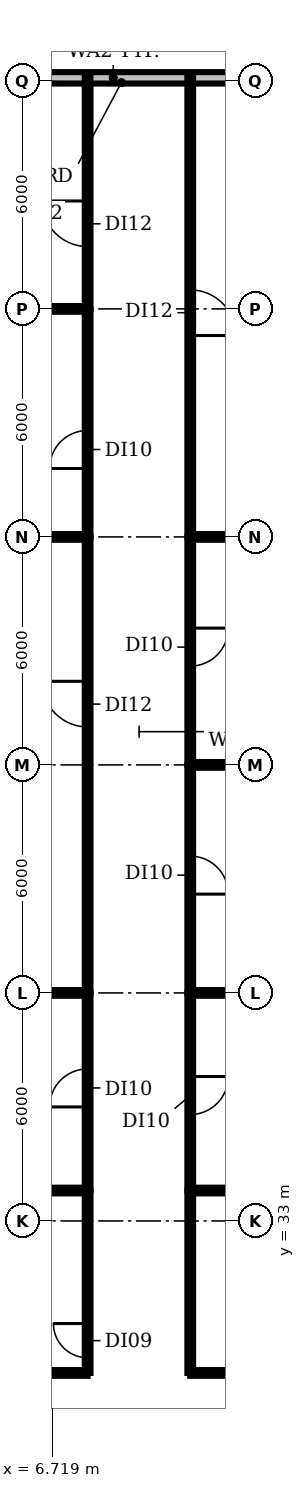
"""IFC4 building model, lengths in metres.
Left out: names, types, materials, properties, quantities, classifications, styles, units other than length and angle.
Written with IfcOpenShell. Run it as: python <this file> out.ifc"""

import sys

from ifc_helpers import new_model, si_unit, direction, frame, frame_2d, origin, place, context, subcontext, project, spatial, rectangle, extrude, element, fill, save


model = new_model("IFC4")
c1 = context("Model", 3, precision=1e-05, world=origin(), true_north=direction((0.0, 1.0)))
c2 = subcontext(c1, "Body", "Model", "MODEL_VIEW")
j1 = project(units=[si_unit("LENGTHUNIT", "METRE"), si_unit("PLANEANGLEUNIT", "RADIAN")], contexts=[c1])
p1 = place(None, origin())
s1 = spatial("IfcSite", under=j1, at=p1, CompositionType="ELEMENT")
p2 = place(p1, origin())
s2 = spatial("IfcBuilding", under=s1, at=p2, CompositionType="ELEMENT")
p3 = place(p2, frame((0.0, 0.0, 297.8)))
s3 = spatial("IfcBuildingStorey", under=s2, at=p3, CompositionType="ELEMENT", Elevation=297.8)
p4 = place(p3, frame((13.217, 63.08, 0.0), z_axis=(0.0, 0.0, 1.0), x_axis=(-1.0, 0.0, 0.0)))
e1 = element("IfcWall", 1, at=p4, inside=s3, PredefinedType="SOLIDWALL", context=c2, shape_type="SweptSolid", body=[
    extrude(rectangle(XDim=9.785, YDim=0.3, at=frame_2d((4.893, 0.0))), origin(), (0.0, 0.0, 1.0), 3.85),
])
p5 = place(p3, frame((-2.24, 57.0, 0.0), z_axis=(0.0, 0.0, 1.0), x_axis=(1.0, 0.0, 0.0)))
e2 = element("IfcWall", 2, at=p5, inside=s3, PredefinedType="PARTITIONING", context=c2, shape_type="SweptSolid", body=[
    extrude(rectangle(XDim=9.89, YDim=0.15, at=frame_2d((4.945, 0.0))), origin(), (0.0, 0.0, 1.0), 2.9),
])
p6 = place(p3, frame((-1.98, 51.0, 0.0), z_axis=(0.0, 0.0, 1.0), x_axis=(1.0, 0.0, 0.0)))
e3 = element("IfcWall", 3, at=p6, inside=s3, PredefinedType="PARTITIONING", context=c2, shape_type="SweptSolid", body=[
    extrude(rectangle(XDim=9.63, YDim=0.15, at=frame_2d((4.815, 0.0))), origin(), (0.0, 0.0, 1.0), 2.9),
])
p7 = place(p3, frame((-1.46, 39.0, 0.0), z_axis=(0.0, 0.0, 1.0), x_axis=(1.0, 0.0, 0.0)))
e4 = element("IfcWall", 4, at=p7, inside=s3, PredefinedType="PARTITIONING", context=c2, shape_type="SweptSolid", body=[
    extrude(rectangle(XDim=9.11, YDim=0.15, at=frame_2d((4.555, 0.0))), origin(), (0.0, 0.0, 1.0), 2.9),
])
p8 = place(p3, frame((-1.23, 33.8, 0.0), z_axis=(0.0, 0.0, 1.0), x_axis=(1.0, 0.0, 0.0)))
e5 = element("IfcWall", 5, at=p8, inside=s3, PredefinedType="PARTITIONING", context=c2, shape_type="SweptSolid", body=[
    extrude(rectangle(XDim=8.88, YDim=0.15, at=frame_2d((4.44, 0.0))), origin(), (0.0, 0.0, 1.0), 2.9),
])
p9 = place(p3, frame((3.0, 29.0, 0.0), z_axis=(0.0, 0.0, 1.0), x_axis=(1.0, 0.0, 0.0)))
e6 = element("IfcWall", 6, at=p9, inside=s3, PredefinedType="PARTITIONING", context=c2, shape_type="SweptSolid", body=[
    extrude(rectangle(XDim=4.65, YDim=0.15, at=frame_2d((2.325, 0.0))), origin(), (0.0, 0.0, 1.0), 2.9),
])
p10 = place(p3, frame((7.65, 29.0, 0.0), z_axis=(0.0, 0.0, 1.0), x_axis=(0.0, 1.0, 0.0)))
e7 = element("IfcWall", 7, at=p10, inside=s3, PredefinedType="PARTITIONING", context=c2, shape_type="SweptSolid", body=[
    extrude(rectangle(XDim=4.8, YDim=0.15, at=frame_2d((2.4, 0.0))), origin(), (0.0, 0.0, 1.0), 2.9),
])
p11 = place(p10, frame((0.4, 0.0, 0.0)))
e8 = element("IfcOpeningElement", 8, at=p11, cuts=e7, PredefinedType="OPENING", context=c2, shape_type="SweptSolid", body=[
    extrude(rectangle(XDim=0.9, YDim=2.1, at=frame_2d((0.45, 1.05))), frame((0.0, 0.085, 0.0), z_axis=(0.0, -1.0, 0.0), x_axis=(1.0, 0.0, 0.0)), (0.0, 0.0, 1.0), 0.17),
])
p12 = place(p3, frame((7.65, 33.8, 0.0), z_axis=(0.0, 0.0, 1.0), x_axis=(0.0, 1.0, 0.0)))
e9 = element("IfcWall", 9, at=p12, inside=s3, PredefinedType="PARTITIONING", context=c2, shape_type="SweptSolid", body=[
    extrude(rectangle(XDim=5.2, YDim=0.15, at=frame_2d((2.6, 0.0))), origin(), (0.0, 0.0, 1.0), 2.9),
])
p13 = place(p12, frame((2.2, 0.0, 0.0)))
e10 = element("IfcOpeningElement", 10, at=p13, cuts=e9, PredefinedType="OPENING", context=c2, shape_type="SweptSolid", body=[
    extrude(rectangle(XDim=1.0, YDim=2.1, at=frame_2d((0.5, 1.05))), frame((0.0, 0.085, 0.0), z_axis=(0.0, -1.0, 0.0), x_axis=(1.0, 0.0, 0.0)), (0.0, 0.0, 1.0), 0.17),
])
p14 = place(p3, frame((7.65, 39.0, 0.0), z_axis=(0.0, 0.0, 1.0), x_axis=(0.0, 1.0, 0.0)))
e11 = element("IfcWall", 11, at=p14, inside=s3, PredefinedType="PARTITIONING", context=c2, shape_type="SweptSolid", body=[
    extrude(rectangle(XDim=12.0, YDim=0.15, at=frame_2d((6.0, 0.0))), origin(), (0.0, 0.0, 1.0), 2.9),
])
p15 = place(p14, frame((7.0, 0.0, 0.0)))
e12 = element("IfcOpeningElement", 12, at=p15, cuts=e11, PredefinedType="OPENING", context=c2, shape_type="SweptSolid", body=[
    extrude(rectangle(XDim=1.2, YDim=2.1, at=frame_2d((0.6, 1.05))), frame((0.0, 0.085, 0.0), z_axis=(0.0, -1.0, 0.0), x_axis=(1.0, 0.0, 0.0)), (0.0, 0.0, 1.0), 0.17),
])
p16 = place(p3, frame((7.65, 51.0, 0.0), z_axis=(0.0, 0.0, 1.0), x_axis=(0.0, 1.0, 0.0)))
e13 = element("IfcWall", 13, at=p16, inside=s3, PredefinedType="PARTITIONING", context=c2, shape_type="SweptSolid", body=[
    extrude(rectangle(XDim=6.0, YDim=0.15, at=frame_2d((3.0, 0.0))), origin(), (0.0, 0.0, 1.0), 2.9),
])
p17 = place(p16, frame((1.8, 0.0, 0.0)))
e14 = element("IfcOpeningElement", 14, at=p17, cuts=e13, PredefinedType="OPENING", context=c2, shape_type="SweptSolid", body=[
    extrude(rectangle(XDim=1.0, YDim=2.1, at=frame_2d((0.5, 1.05))), frame((0.0, 0.085, 0.0), z_axis=(0.0, -1.0, 0.0), x_axis=(1.0, 0.0, 0.0)), (0.0, 0.0, 1.0), 0.17),
])
p18 = place(p3, frame((7.65, 57.0, 0.0), z_axis=(0.0, 0.0, 1.0), x_axis=(0.0, 1.0, 0.0)))
e15 = element("IfcWall", 15, at=p18, inside=s3, PredefinedType="PARTITIONING", context=c2, shape_type="SweptSolid", body=[
    extrude(rectangle(XDim=6.09, YDim=0.15, at=frame_2d((3.045, 0.0))), origin(), (0.0, 0.0, 1.0), 2.9),
])
p19 = place(p18, frame((1.64, 0.0, 0.0)))
e16 = element("IfcOpeningElement", 16, at=p19, cuts=e15, PredefinedType="OPENING", context=c2, shape_type="SweptSolid", body=[
    extrude(rectangle(XDim=1.2, YDim=2.1, at=frame_2d((0.6, 1.05))), frame((0.0, 0.085, 0.0), z_axis=(0.0, -1.0, 0.0), x_axis=(1.0, 0.0, 0.0)), (0.0, 0.0, 1.0), 0.17),
])
p20 = place(p3, frame((10.35, 29.0, 0.0), z_axis=(0.0, 0.0, 1.0), x_axis=(0.0, 1.0, 0.0)))
e17 = element("IfcWall", 17, at=p20, inside=s3, PredefinedType="PARTITIONING", context=c2, shape_type="SweptSolid", body=[
    extrude(rectangle(XDim=4.8, YDim=0.15, at=frame_2d((2.4, 0.0))), origin(), (0.0, 0.0, 1.0), 2.9),
])
p21 = place(p3, frame((10.35, 29.0, 0.0), z_axis=(0.0, 0.0, 1.0), x_axis=(1.0, 0.0, 0.0)))
e18 = element("IfcWall", 18, at=p21, inside=s3, PredefinedType="PARTITIONING", context=c2, shape_type="SweptSolid", body=[
    extrude(rectangle(XDim=4.05, YDim=0.15, at=frame_2d((2.025, 0.0))), origin(), (0.0, 0.0, 1.0), 2.9),
])
p22 = place(p3, frame((10.35, 33.8, 0.0), z_axis=(0.0, 0.0, 1.0), x_axis=(1.0, 0.0, 0.0)))
e19 = element("IfcWall", 19, at=p22, inside=s3, PredefinedType="PARTITIONING", context=c2, shape_type="SweptSolid", body=[
    extrude(rectangle(XDim=11.03, YDim=0.15, at=frame_2d((5.515, 0.0))), origin(), (0.0, 0.0, 1.0), 2.9),
])
p23 = place(p3, frame((10.35, 39.0, 0.0), z_axis=(0.0, 0.0, 1.0), x_axis=(0.0, -1.0, 0.0)))
e20 = element("IfcWall", 20, at=p23, inside=s3, PredefinedType="PARTITIONING", context=c2, shape_type="SweptSolid", body=[
    extrude(rectangle(XDim=5.2, YDim=0.15, at=frame_2d((2.6, 0.0))), origin(), (0.0, 0.0, 1.0), 2.9),
])
p24 = place(p23, frame((2.2, 0.0, 0.0)))
e21 = element("IfcOpeningElement", 21, at=p24, cuts=e20, PredefinedType="OPENING", context=c2, shape_type="SweptSolid", body=[
    extrude(rectangle(XDim=1.0, YDim=2.1, at=frame_2d((0.5, 1.05))), frame((0.0, 0.085, 0.0), z_axis=(0.0, -1.0, 0.0), x_axis=(1.0, 0.0, 0.0)), (0.0, 0.0, 1.0), 0.17),
])
p25 = place(p3, frame((10.35, 39.0, 0.0), z_axis=(0.0, 0.0, 1.0), x_axis=(1.0, 0.0, 0.0)))
e22 = element("IfcWall", 22, at=p25, inside=s3, PredefinedType="PARTITIONING", context=c2, shape_type="SweptSolid", body=[
    extrude(rectangle(XDim=14.63, YDim=0.15, at=frame_2d((7.315, 0.0))), origin(), (0.0, 0.0, 1.0), 2.9),
])
p26 = place(p3, frame((10.35, 45.0, 0.0), z_axis=(0.0, 0.0, 1.0), x_axis=(0.0, -1.0, 0.0)))
e23 = element("IfcWall", 23, at=p26, inside=s3, PredefinedType="PARTITIONING", context=c2, shape_type="SweptSolid", body=[
    extrude(rectangle(XDim=6.0, YDim=0.15, at=frame_2d((3.0, 0.0))), origin(), (0.0, 0.0, 1.0), 2.9),
])
p27 = place(p26, frame((2.4, 0.0, 0.0)))
e24 = element("IfcOpeningElement", 24, at=p27, cuts=e23, PredefinedType="OPENING", context=c2, shape_type="SweptSolid", body=[
    extrude(rectangle(XDim=1.0, YDim=2.1, at=frame_2d((0.5, 1.05))), frame((0.0, 0.085, 0.0), z_axis=(0.0, -1.0, 0.0), x_axis=(1.0, 0.0, 0.0)), (0.0, 0.0, 1.0), 0.17),
])
p28 = place(p3, frame((10.35, 45.0, 0.0), z_axis=(0.0, 0.0, 1.0), x_axis=(1.0, 0.0, 0.0)))
e25 = element("IfcWall", 25, at=p28, inside=s3, PredefinedType="PARTITIONING", context=c2, shape_type="SweptSolid", body=[
    extrude(rectangle(XDim=14.63, YDim=0.15, at=frame_2d((7.315, 0.0))), origin(), (0.0, 0.0, 1.0), 2.9),
])
p29 = place(p3, frame((10.35, 51.0, 0.0), z_axis=(0.0, 0.0, 1.0), x_axis=(0.0, -1.0, 0.0)))
e26 = element("IfcWall", 26, at=p29, inside=s3, PredefinedType="PARTITIONING", context=c2, shape_type="SweptSolid", body=[
    extrude(rectangle(XDim=6.0, YDim=0.15, at=frame_2d((3.0, 0.0))), origin(), (0.0, 0.0, 1.0), 2.9),
])
p30 = place(p29, frame((2.4, 0.0, 0.0)))
e27 = element("IfcOpeningElement", 27, at=p30, cuts=e26, PredefinedType="OPENING", context=c2, shape_type="SweptSolid", body=[
    extrude(rectangle(XDim=1.0, YDim=2.1, at=frame_2d((0.5, 1.05))), frame((0.0, 0.085, 0.0), z_axis=(0.0, -1.0, 0.0), x_axis=(1.0, 0.0, 0.0)), (0.0, 0.0, 1.0), 0.17),
])
p31 = place(p3, frame((10.35, 51.0, 0.0), z_axis=(0.0, 0.0, 1.0), x_axis=(1.0, 0.0, 0.0)))
e28 = element("IfcWall", 28, at=p31, inside=s3, PredefinedType="PARTITIONING", context=c2, shape_type="SweptSolid", body=[
    extrude(rectangle(XDim=14.63, YDim=0.15, at=frame_2d((7.315, 0.0))), origin(), (0.0, 0.0, 1.0), 2.9),
])
p32 = place(p3, frame((10.35, 63.09, 0.0), z_axis=(0.0, 0.0, 1.0), x_axis=(0.0, -1.0, 0.0)))
e29 = element("IfcWall", 29, at=p32, inside=s3, PredefinedType="PARTITIONING", context=c2, shape_type="SweptSolid", body=[
    extrude(rectangle(XDim=12.09, YDim=0.15, at=frame_2d((6.045, 0.0))), origin(), (0.0, 0.0, 1.0), 2.9),
])
p33 = place(p32, frame((5.59, 0.0, 0.0)))
e30 = element("IfcOpeningElement", 30, at=p33, cuts=e29, PredefinedType="OPENING", context=c2, shape_type="SweptSolid", body=[
    extrude(rectangle(XDim=1.2, YDim=2.1, at=frame_2d((0.6, 1.05))), frame((0.0, 0.085, 0.0), z_axis=(0.0, -1.0, 0.0), x_axis=(1.0, 0.0, 0.0)), (0.0, 0.0, 1.0), 0.17),
])
p34 = place(p11, origin())
e31 = element("IfcDoor", 31, at=p34, inside=s3, OperationType="SINGLE_SWING_RIGHT", PredefinedType="DOOR", context=c2, shape_type="SweptSolid", body=[
    extrude(rectangle(XDim=0.9, YDim=2.1, at=frame_2d((0.45, 1.05))), frame((0.0, 0.025, 0.0), z_axis=(0.0, -1.0, 0.0), x_axis=(1.0, 0.0, 0.0)), (0.0, 0.0, 1.0), 0.05),
])
fill(e8, e31)
p35 = place(p13, origin())
e32 = element("IfcDoor", 32, at=p35, inside=s3, OperationType="SINGLE_SWING_LEFT", PredefinedType="DOOR", context=c2, shape_type="SweptSolid", body=[
    extrude(rectangle(XDim=1.0, YDim=2.1, at=frame_2d((0.5, 1.05))), frame((0.0, 0.025, 0.0), z_axis=(0.0, -1.0, 0.0), x_axis=(1.0, 0.0, 0.0)), (0.0, 0.0, 1.0), 0.05),
])
fill(e10, e32)
p36 = place(p15, origin())
e33 = element("IfcDoor", 33, at=p36, inside=s3, OperationType="SINGLE_SWING_RIGHT", PredefinedType="DOOR", context=c2, shape_type="SweptSolid", body=[
    extrude(rectangle(XDim=1.2, YDim=2.1, at=frame_2d((0.6, 1.05))), frame((0.0, 0.025, 0.0), z_axis=(0.0, -1.0, 0.0), x_axis=(1.0, 0.0, 0.0)), (0.0, 0.0, 1.0), 0.05),
])
fill(e12, e33)
p37 = place(p17, origin())
e34 = element("IfcDoor", 34, at=p37, inside=s3, OperationType="SINGLE_SWING_LEFT", PredefinedType="DOOR", context=c2, shape_type="SweptSolid", body=[
    extrude(rectangle(XDim=1.0, YDim=2.1, at=frame_2d((0.5, 1.05))), frame((0.0, 0.025, 0.0), z_axis=(0.0, -1.0, 0.0), x_axis=(1.0, 0.0, 0.0)), (0.0, 0.0, 1.0), 0.05),
])
fill(e14, e34)
p38 = place(p19, origin())
e35 = element("IfcDoor", 35, at=p38, inside=s3, OperationType="SINGLE_SWING_RIGHT", PredefinedType="DOOR", context=c2, shape_type="SweptSolid", body=[
    extrude(rectangle(XDim=1.2, YDim=2.1, at=frame_2d((0.6, 1.05))), frame((0.0, 0.025, 0.0), z_axis=(0.0, -1.0, 0.0), x_axis=(1.0, 0.0, 0.0)), (0.0, 0.0, 1.0), 0.05),
])
fill(e16, e35)
p39 = place(p24, origin())
e36 = element("IfcDoor", 36, at=p39, inside=s3, OperationType="SINGLE_SWING_LEFT", PredefinedType="DOOR", context=c2, shape_type="SweptSolid", body=[
    extrude(rectangle(XDim=1.0, YDim=2.1, at=frame_2d((0.5, 1.05))), frame((0.0, 0.025, 0.0), z_axis=(0.0, -1.0, 0.0), x_axis=(1.0, 0.0, 0.0)), (0.0, 0.0, 1.0), 0.05),
])
fill(e21, e36)
p40 = place(p27, origin())
e37 = element("IfcDoor", 37, at=p40, inside=s3, OperationType="SINGLE_SWING_RIGHT", PredefinedType="DOOR", context=c2, shape_type="SweptSolid", body=[
    extrude(rectangle(XDim=1.0, YDim=2.1, at=frame_2d((0.5, 1.05))), frame((0.0, 0.025, 0.0), z_axis=(0.0, -1.0, 0.0), x_axis=(1.0, 0.0, 0.0)), (0.0, 0.0, 1.0), 0.05),
])
fill(e24, e37)
p41 = place(p30, origin())
e38 = element("IfcDoor", 38, at=p41, inside=s3, OperationType="SINGLE_SWING_LEFT", PredefinedType="DOOR", context=c2, shape_type="SweptSolid", body=[
    extrude(rectangle(XDim=1.0, YDim=2.1, at=frame_2d((0.5, 1.05))), frame((0.0, 0.025, 0.0), z_axis=(0.0, -1.0, 0.0), x_axis=(1.0, 0.0, 0.0)), (0.0, 0.0, 1.0), 0.05),
])
fill(e27, e38)
p42 = place(p33, origin())
e39 = element("IfcDoor", 39, at=p42, inside=s3, OperationType="SINGLE_SWING_RIGHT", PredefinedType="DOOR", context=c2, shape_type="SweptSolid", body=[
    extrude(rectangle(XDim=1.2, YDim=2.1, at=frame_2d((0.6, 1.05))), frame((0.0, 0.025, 0.0), z_axis=(0.0, -1.0, 0.0), x_axis=(1.0, 0.0, 0.0)), (0.0, 0.0, 1.0), 0.05),
])
fill(e30, e39)
save(model, sys.argv[1])
